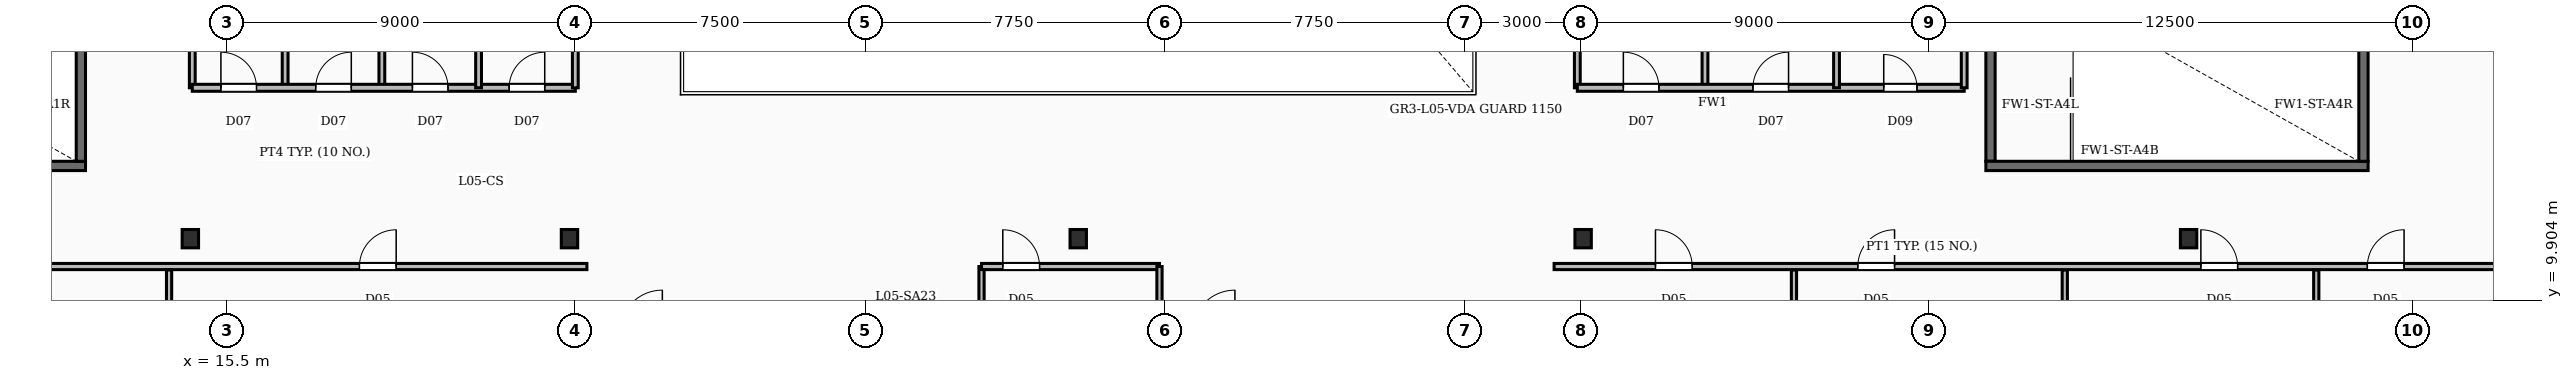
"""IFC4 building model, lengths in metres.
Left out: names, types, materials, properties, quantities, classifications, styles, units other than length and angle.
Written with IfcOpenShell. Run it as: python <this file> out.ifc"""

import sys

from ifc_helpers import new_model, si_unit, direction, frame, frame_2d, origin, origin_2d, place, context, subcontext, project, spatial, rectangle, i_section, extrude, element, fill, save


model = new_model("IFC4")
c1 = context("Model", 3, precision=1e-05, world=origin(), true_north=direction((0.0, 1.0)))
c2 = subcontext(c1, "Body", "Model", "MODEL_VIEW")
j1 = project(units=[si_unit("LENGTHUNIT", "METRE"), si_unit("PLANEANGLEUNIT", "RADIAN")], contexts=[c1])
p1 = place(None, origin())
s1 = spatial("IfcSite", under=j1, at=p1, CompositionType="ELEMENT")
p2 = place(p1, origin())
s2 = spatial("IfcBuilding", under=s1, at=p2, CompositionType="ELEMENT")
p3 = place(p2, frame((0.0, 0.0, 28.0)))
s3 = spatial("IfcBuildingStorey", under=s2, at=p3, CompositionType="ELEMENT", Elevation=28.0)
for number, where, z_axis, x_axis in (
    (1, (14.55, 11.5, -0.35), (0.0, 0.0, 1.0), (1.0, 0.0, 0.0)),
    (2, (24.35, 11.5, -0.35), (0.0, 0.0, 1.0), (1.0, 0.0, 0.0)),
    (3, (37.5, 11.5, -0.35), (0.0, 0.0, 1.0), (1.0, 0.0, 0.0)),
    (4, (50.55, 11.5, -0.35), (0.0, 0.0, 1.0), (1.0, 0.0, 0.0)),
    (5, (66.2, 11.5, -0.35), (0.0, 0.0, 1.0), (1.0, 0.0, 0.0)),
):
    element("IfcColumn", number, at=place(p3, frame(where, z_axis=z_axis, x_axis=x_axis)), inside=s3, PredefinedType="COLUMN", context=c2, shape_type="SweptSolid", body=[
        extrude(i_section(OverallWidth=0.424, OverallDepth=0.474, WebThickness=0.048, FlangeThickness=0.077, FilletRadius=0.02, at=origin_2d()), origin(), (0.0, 0.0, 1.0), 5.9),
    ])
p4 = place(p3, frame((1.96, 13.38, 0.0), z_axis=(0.0, 0.0, 1.0), x_axis=(1.0, 0.0, 0.0)))
e6 = element("IfcWall", 6, at=p4, inside=s3, PredefinedType="SOLIDWALL", context=c2, shape_type="SweptSolid", body=[
    extrude(rectangle(XDim=9.88, YDim=0.24, at=frame_2d((4.94, 0.0))), origin(), (0.0, 0.0, 1.0), 5.55),
])
p5 = place(p3, frame((11.72, 13.5, 0.0), z_axis=(0.0, 0.0, 1.0), x_axis=(0.0, 1.0, 0.0)))
e7 = element("IfcWall", 7, at=p5, inside=s3, PredefinedType="SOLIDWALL", context=c2, shape_type="SweptSolid", body=[
    extrude(rectangle(XDim=4.15, YDim=0.24, at=frame_2d((2.075, 0.0))), origin(), (0.0, 0.0, 1.0), 5.55),
])
p6 = place(p3, frame((60.96, 13.38, 0.0), z_axis=(0.0, 0.0, 1.0), x_axis=(1.0, 0.0, 0.0)))
e8 = element("IfcWall", 8, at=p6, inside=s3, PredefinedType="SOLIDWALL", context=c2, shape_type="SweptSolid", body=[
    extrude(rectangle(XDim=9.88, YDim=0.24, at=frame_2d((4.94, 0.0))), origin(), (0.0, 0.0, 1.0), 5.55),
])
for number, where, z_axis, x_axis in (
    (9, (61.08, 13.5, 0.0), (0.0, 0.0, 1.0), (0.0, 1.0, 0.0)),
    (10, (70.72, 13.5, 0.0), (0.0, 0.0, 1.0), (0.0, 1.0, 0.0)),
):
    element("IfcWall", number, at=place(p3, frame(where, z_axis=z_axis, x_axis=x_axis)), inside=s3, PredefinedType="SOLIDWALL", context=c2, shape_type="SweptSolid", body=[
        extrude(rectangle(XDim=4.15, YDim=0.24, at=frame_2d((2.075, 0.0))), origin(), (0.0, 0.0, 1.0), 5.55),
    ])
for number, where, z_axis, x_axis in (
    (11, (17.0, 15.4, 0.0), (0.0, 0.0, 1.0), (0.0, 1.0, 0.0)),
    (12, (19.5, 15.4, 0.0), (0.0, 0.0, 1.0), (0.0, 1.0, 0.0)),
    (13, (22.0, 15.4, 0.0), (0.0, 0.0, 1.0), (0.0, 1.0, 0.0)),
):
    element("IfcWall", number, at=place(p3, frame(where, z_axis=z_axis, x_axis=x_axis)), inside=s3, PredefinedType="PARTITIONING", context=c2, shape_type="SweptSolid", body=[
        extrude(rectangle(XDim=3.58, YDim=0.15, at=frame_2d((1.79, 0.0))), origin(), (0.0, 0.0, 1.0), 4.61),
    ])
p7 = place(p3, frame((14.6, 15.4, 0.0), z_axis=(0.0, 0.0, 1.0), x_axis=(1.0, 0.0, 0.0)))
e14 = element("IfcWall", 14, at=p7, inside=s3, PredefinedType="PARTITIONING", context=c2, shape_type="SweptSolid", body=[
    extrude(rectangle(XDim=9.9, YDim=0.18, at=frame_2d((4.95, 0.0))), origin(), (0.0, 0.0, 1.0), 4.61),
])
p8 = place(p7, frame((0.74, 0.0, 0.0)))
e15 = element("IfcOpeningElement", 15, at=p8, cuts=e14, PredefinedType="OPENING", context=c2, shape_type="SweptSolid", body=[
    extrude(rectangle(XDim=0.92, YDim=2.1, at=frame_2d((0.46, 1.05))), frame((0.0, 0.1, 0.0), z_axis=(0.0, -1.0, 0.0), x_axis=(1.0, 0.0, 0.0)), (0.0, 0.0, 1.0), 0.2),
])
p9 = place(p7, frame((3.19, 0.0, 0.0)))
e16 = element("IfcOpeningElement", 16, at=p9, cuts=e14, PredefinedType="OPENING", context=c2, shape_type="SweptSolid", body=[
    extrude(rectangle(XDim=0.92, YDim=2.1, at=frame_2d((0.46, 1.05))), frame((0.0, 0.1, 0.0), z_axis=(0.0, -1.0, 0.0), x_axis=(1.0, 0.0, 0.0)), (0.0, 0.0, 1.0), 0.2),
])
p10 = place(p7, frame((5.69, 0.0, 0.0)))
e17 = element("IfcOpeningElement", 17, at=p10, cuts=e14, PredefinedType="OPENING", context=c2, shape_type="SweptSolid", body=[
    extrude(rectangle(XDim=0.92, YDim=2.1, at=frame_2d((0.46, 1.05))), frame((0.0, 0.1, 0.0), z_axis=(0.0, -1.0, 0.0), x_axis=(1.0, 0.0, 0.0)), (0.0, 0.0, 1.0), 0.2),
])
p11 = place(p7, frame((8.19, 0.0, 0.0)))
e18 = element("IfcOpeningElement", 18, at=p11, cuts=e14, PredefinedType="OPENING", context=c2, shape_type="SweptSolid", body=[
    extrude(rectangle(XDim=0.92, YDim=2.1, at=frame_2d((0.46, 1.05))), frame((0.0, 0.1, 0.0), z_axis=(0.0, -1.0, 0.0), x_axis=(1.0, 0.0, 0.0)), (0.0, 0.0, 1.0), 0.2),
])
p12 = place(p3, frame((14.6, 15.4, 0.0), z_axis=(0.0, 0.0, 1.0), x_axis=(0.0, 1.0, 0.0)))
e19 = element("IfcWall", 19, at=p12, inside=s3, PredefinedType="PARTITIONING", context=c2, shape_type="SweptSolid", body=[
    extrude(rectangle(XDim=3.58, YDim=0.15, at=frame_2d((1.79, 0.0))), origin(), (0.0, 0.0, 1.0), 3.6),
])
for number, where, z_axis, x_axis in (
    (20, (24.5, 15.4, 0.0), (0.0, 0.0, 1.0), (0.0, 1.0, 0.0)),
    (21, (53.7, 15.4, 0.0), (0.0, 0.0, 1.0), (0.0, 1.0, 0.0)),
    (22, (57.1, 15.4, 0.0), (0.0, 0.0, 1.0), (0.0, 1.0, 0.0)),
):
    element("IfcWall", number, at=place(p3, frame(where, z_axis=z_axis, x_axis=x_axis)), inside=s3, PredefinedType="PARTITIONING", context=c2, shape_type="SweptSolid", body=[
        extrude(rectangle(XDim=3.58, YDim=0.15, at=frame_2d((1.79, 0.0))), origin(), (0.0, 0.0, 1.0), 4.61),
    ])
p13 = place(p3, frame((50.4, 15.4, 0.0), z_axis=(0.0, 0.0, 1.0), x_axis=(1.0, 0.0, 0.0)))
e23 = element("IfcWall", 23, at=p13, inside=s3, PredefinedType="SOLIDWALL", context=c2, shape_type="SweptSolid", body=[
    extrude(rectangle(XDim=10.0, YDim=0.18, at=frame_2d((5.0, 0.0))), origin(), (0.0, 0.0, 1.0), 4.61),
])
p14 = place(p13, frame((1.19, 0.0, 0.0)))
e24 = element("IfcOpeningElement", 24, at=p14, cuts=e23, PredefinedType="OPENING", context=c2, shape_type="SweptSolid", body=[
    extrude(rectangle(XDim=0.92, YDim=2.1, at=frame_2d((0.46, 1.05))), frame((0.0, 0.1, 0.0), z_axis=(0.0, -1.0, 0.0), x_axis=(1.0, 0.0, 0.0)), (0.0, 0.0, 1.0), 0.2),
])
p15 = place(p13, frame((4.54, 0.0, 0.0)))
e25 = element("IfcOpeningElement", 25, at=p15, cuts=e23, PredefinedType="OPENING", context=c2, shape_type="SweptSolid", body=[
    extrude(rectangle(XDim=0.92, YDim=2.1, at=frame_2d((0.46, 1.05))), frame((0.0, 0.1, 0.0), z_axis=(0.0, -1.0, 0.0), x_axis=(1.0, 0.0, 0.0)), (0.0, 0.0, 1.0), 0.2),
])
p16 = place(p13, frame((7.92, 0.0, 0.0)))
e26 = element("IfcOpeningElement", 26, at=p16, cuts=e23, PredefinedType="OPENING", context=c2, shape_type="SweptSolid", body=[
    extrude(rectangle(XDim=0.86, YDim=2.05, at=frame_2d((0.43, 1.025))), frame((0.0, 0.1, 0.0), z_axis=(0.0, -1.0, 0.0), x_axis=(1.0, 0.0, 0.0)), (0.0, 0.0, 1.0), 0.2),
])
for number, where, z_axis, x_axis in (
    (27, (50.4, 15.4, 0.0), (0.0, 0.0, 1.0), (0.0, 1.0, 0.0)),
    (28, (60.4, 15.4, 0.0), (0.0, 0.0, 1.0), (0.0, 1.0, 0.0)),
):
    element("IfcWall", number, at=place(p3, frame(where, z_axis=z_axis, x_axis=x_axis)), inside=s3, PredefinedType="PARTITIONING", context=c2, shape_type="SweptSolid", body=[
        extrude(rectangle(XDim=3.58, YDim=0.15, at=frame_2d((1.79, 0.0))), origin(), (0.0, 0.0, 1.0), 4.61),
    ])
p17 = place(p3, frame((14.0, 0.0, 0.0), z_axis=(0.0, 0.0, 1.0), x_axis=(0.0, 1.0, 0.0)))
e29 = element("IfcWall", 29, at=p17, inside=s3, PredefinedType="PARTITIONING", context=c2, shape_type="SweptSolid", body=[
    extrude(rectangle(XDim=10.69, YDim=0.135, at=frame_2d((5.345, 0.0))), origin(), (0.0, 0.0, 1.0), 4.61),
])
p18 = place(p17, frame((2.2, 0.0, 0.0)))
e30 = element("IfcOpeningElement", 30, at=p18, cuts=e29, PredefinedType="OPENING", context=c2, shape_type="SweptSolid", body=[
    extrude(rectangle(XDim=0.95, YDim=2.15, at=frame_2d((0.475, 1.075))), frame((0.0, 0.077, 0.0), z_axis=(0.0, -1.0, 0.0), x_axis=(1.0, 0.0, 0.0)), (0.0, 0.0, 1.0), 0.155),
])
p19 = place(p3, frame((0.0, 10.78, 0.0), z_axis=(0.0, 0.0, 1.0), x_axis=(1.0, 0.0, 0.0)))
e31 = element("IfcWall", 31, at=p19, inside=s3, PredefinedType="PARTITIONING", context=c2, shape_type="SweptSolid", body=[
    extrude(rectangle(XDim=24.8, YDim=0.16, at=frame_2d((12.4, 0.0))), origin(), (0.0, 0.0, 1.0), 4.61),
])
p20 = place(p19, frame((18.92, 0.0, 0.0)))
e32 = element("IfcOpeningElement", 32, at=p20, cuts=e31, PredefinedType="OPENING", context=c2, shape_type="SweptSolid", body=[
    extrude(rectangle(XDim=0.95, YDim=2.15, at=frame_2d((0.475, 1.075))), frame((0.0, 0.09, 0.0), z_axis=(0.0, -1.0, 0.0), x_axis=(1.0, 0.0, 0.0)), (0.0, 0.0, 1.0), 0.18),
])
p21 = place(p3, frame((56.0, 0.0, 0.0), z_axis=(0.0, 0.0, 1.0), x_axis=(0.0, 1.0, 0.0)))
e33 = element("IfcWall", 33, at=p21, inside=s3, PredefinedType="PARTITIONING", context=c2, shape_type="SweptSolid", body=[
    extrude(rectangle(XDim=10.69, YDim=0.135, at=frame_2d((5.345, 0.0))), origin(), (0.0, 0.0, 1.0), 4.61),
])
p22 = place(p21, frame((2.2, 0.0, 0.0)))
e34 = element("IfcOpeningElement", 34, at=p22, cuts=e33, PredefinedType="OPENING", context=c2, shape_type="SweptSolid", body=[
    extrude(rectangle(XDim=0.95, YDim=2.15, at=frame_2d((0.475, 1.075))), frame((0.0, 0.077, 0.0), z_axis=(0.0, -1.0, 0.0), x_axis=(1.0, 0.0, 0.0)), (0.0, 0.0, 1.0), 0.155),
])
p23 = place(p3, frame((63.0, 0.0, 0.0), z_axis=(0.0, 0.0, 1.0), x_axis=(0.0, 1.0, 0.0)))
e35 = element("IfcWall", 35, at=p23, inside=s3, PredefinedType="PARTITIONING", context=c2, shape_type="SweptSolid", body=[
    extrude(rectangle(XDim=10.69, YDim=0.135, at=frame_2d((5.345, 0.0))), origin(), (0.0, 0.0, 1.0), 4.61),
])
p24 = place(p23, frame((2.2, 0.0, 0.0)))
e36 = element("IfcOpeningElement", 36, at=p24, cuts=e35, PredefinedType="OPENING", context=c2, shape_type="SweptSolid", body=[
    extrude(rectangle(XDim=0.95, YDim=2.15, at=frame_2d((0.475, 1.075))), frame((0.0, 0.077, 0.0), z_axis=(0.0, -1.0, 0.0), x_axis=(1.0, 0.0, 0.0)), (0.0, 0.0, 1.0), 0.155),
])
p25 = place(p3, frame((69.5, 0.0, 0.0), z_axis=(0.0, 0.0, 1.0), x_axis=(0.0, 1.0, 0.0)))
e37 = element("IfcWall", 37, at=p25, inside=s3, PredefinedType="PARTITIONING", context=c2, shape_type="SweptSolid", body=[
    extrude(rectangle(XDim=10.69, YDim=0.135, at=frame_2d((5.345, 0.0))), origin(), (0.0, 0.0, 1.0), 4.61),
])
p26 = place(p25, frame((2.2, 0.0, 0.0)))
e38 = element("IfcOpeningElement", 38, at=p26, cuts=e37, PredefinedType="OPENING", context=c2, shape_type="SweptSolid", body=[
    extrude(rectangle(XDim=0.95, YDim=2.15, at=frame_2d((0.475, 1.075))), frame((0.0, 0.077, 0.0), z_axis=(0.0, -1.0, 0.0), x_axis=(1.0, 0.0, 0.0)), (0.0, 0.0, 1.0), 0.155),
])
p27 = place(p3, frame((49.8, 10.78, 0.0), z_axis=(0.0, 0.0, 1.0), x_axis=(1.0, 0.0, 0.0)))
e39 = element("IfcWall", 39, at=p27, inside=s3, PredefinedType="PARTITIONING", context=c2, shape_type="SweptSolid", body=[
    extrude(rectangle(XDim=29.7, YDim=0.16, at=frame_2d((14.85, 0.0))), origin(), (0.0, 0.0, 1.0), 4.61),
])
p28 = place(p27, frame((2.62, 0.0, 0.0)))
e40 = element("IfcOpeningElement", 40, at=p28, cuts=e39, PredefinedType="OPENING", context=c2, shape_type="SweptSolid", body=[
    extrude(rectangle(XDim=0.95, YDim=2.15, at=frame_2d((0.475, 1.075))), frame((0.0, 0.09, 0.0), z_axis=(0.0, -1.0, 0.0), x_axis=(1.0, 0.0, 0.0)), (0.0, 0.0, 1.0), 0.18),
])
p29 = place(p27, frame((7.85, 0.0, 0.0)))
e41 = element("IfcOpeningElement", 41, at=p29, cuts=e39, PredefinedType="OPENING", context=c2, shape_type="SweptSolid", body=[
    extrude(rectangle(XDim=0.95, YDim=2.15, at=frame_2d((0.475, 1.075))), frame((0.0, 0.09, 0.0), z_axis=(0.0, -1.0, 0.0), x_axis=(1.0, 0.0, 0.0)), (0.0, 0.0, 1.0), 0.18),
])
p30 = place(p27, frame((16.718, 0.0, 0.0)))
e42 = element("IfcOpeningElement", 42, at=p30, cuts=e39, PredefinedType="OPENING", context=c2, shape_type="SweptSolid", body=[
    extrude(rectangle(XDim=0.95, YDim=2.15, at=frame_2d((0.475, 1.075))), frame((0.0, 0.09, 0.0), z_axis=(0.0, -1.0, 0.0), x_axis=(1.0, 0.0, 0.0)), (0.0, 0.0, 1.0), 0.18),
])
p31 = place(p27, frame((21.02, 0.0, 0.0)))
e43 = element("IfcOpeningElement", 43, at=p31, cuts=e39, PredefinedType="OPENING", context=c2, shape_type="SweptSolid", body=[
    extrude(rectangle(XDim=0.95, YDim=2.15, at=frame_2d((0.475, 1.075))), frame((0.0, 0.09, 0.0), z_axis=(0.0, -1.0, 0.0), x_axis=(1.0, 0.0, 0.0)), (0.0, 0.0, 1.0), 0.18),
])
p32 = place(p3, frame((35.0, 10.78, 0.0), z_axis=(0.0, 0.0, 1.0), x_axis=(1.0, 0.0, 0.0)))
e44 = element("IfcWall", 44, at=p32, inside=s3, PredefinedType="PARTITIONING", context=c2, shape_type="SweptSolid", body=[
    extrude(rectangle(XDim=4.6, YDim=0.16, at=frame_2d((2.3, 0.0))), origin(), (0.0, 0.0, 1.0), 4.61),
])
p33 = place(p32, frame((0.55, 0.0, 0.0)))
e45 = element("IfcOpeningElement", 45, at=p33, cuts=e44, PredefinedType="OPENING", context=c2, shape_type="SweptSolid", body=[
    extrude(rectangle(XDim=0.95, YDim=2.15, at=frame_2d((0.475, 1.075))), frame((0.0, 0.09, 0.0), z_axis=(0.0, -1.0, 0.0), x_axis=(1.0, 0.0, 0.0)), (0.0, 0.0, 1.0), 0.18),
])
for number, where, z_axis, x_axis in (
    (46, (35.0, 0.0, 0.0), (0.0, 0.0, 1.0), (0.0, 1.0, 0.0)),
    (47, (39.6, 0.0, 0.0), (0.0, 0.0, 1.0), (0.0, 1.0, 0.0)),
):
    element("IfcWall", number, at=place(p3, frame(where, z_axis=z_axis, x_axis=x_axis)), inside=s3, PredefinedType="PARTITIONING", context=c2, shape_type="SweptSolid", body=[
        extrude(rectangle(XDim=10.78, YDim=0.135, at=frame_2d((5.39, 0.0))), origin(), (0.0, 0.0, 1.0), 4.61),
    ])
p34 = place(p8, origin())
e48 = element("IfcDoor", 48, at=p34, inside=s3, OperationType="SINGLE_SWING_LEFT", PredefinedType="DOOR", context=c2, shape_type="SweptSolid", body=[
    extrude(rectangle(XDim=0.92, YDim=2.1, at=frame_2d((0.46, 1.05))), frame((0.0, 0.025, 0.0), z_axis=(0.0, -1.0, 0.0), x_axis=(1.0, 0.0, 0.0)), (0.0, 0.0, 1.0), 0.05),
])
fill(e15, e48)
p35 = place(p9, origin())
e49 = element("IfcDoor", 49, at=p35, inside=s3, OperationType="SINGLE_SWING_RIGHT", PredefinedType="DOOR", context=c2, shape_type="SweptSolid", body=[
    extrude(rectangle(XDim=0.92, YDim=2.1, at=frame_2d((0.46, 1.05))), frame((0.0, 0.025, 0.0), z_axis=(0.0, -1.0, 0.0), x_axis=(1.0, 0.0, 0.0)), (0.0, 0.0, 1.0), 0.05),
])
fill(e16, e49)
p36 = place(p10, origin())
e50 = element("IfcDoor", 50, at=p36, inside=s3, OperationType="SINGLE_SWING_LEFT", PredefinedType="DOOR", context=c2, shape_type="SweptSolid", body=[
    extrude(rectangle(XDim=0.92, YDim=2.1, at=frame_2d((0.46, 1.05))), frame((0.0, 0.025, 0.0), z_axis=(0.0, -1.0, 0.0), x_axis=(1.0, 0.0, 0.0)), (0.0, 0.0, 1.0), 0.05),
])
fill(e17, e50)
p37 = place(p11, origin())
e51 = element("IfcDoor", 51, at=p37, inside=s3, OperationType="SINGLE_SWING_RIGHT", PredefinedType="DOOR", context=c2, shape_type="SweptSolid", body=[
    extrude(rectangle(XDim=0.92, YDim=2.1, at=frame_2d((0.46, 1.05))), frame((0.0, 0.025, 0.0), z_axis=(0.0, -1.0, 0.0), x_axis=(1.0, 0.0, 0.0)), (0.0, 0.0, 1.0), 0.05),
])
fill(e18, e51)
p38 = place(p14, origin())
e52 = element("IfcDoor", 52, at=p38, inside=s3, OperationType="SINGLE_SWING_LEFT", PredefinedType="DOOR", context=c2, shape_type="SweptSolid", body=[
    extrude(rectangle(XDim=0.92, YDim=2.1, at=frame_2d((0.46, 1.05))), frame((0.0, 0.025, 0.0), z_axis=(0.0, -1.0, 0.0), x_axis=(1.0, 0.0, 0.0)), (0.0, 0.0, 1.0), 0.05),
])
fill(e24, e52)
p39 = place(p15, origin())
e53 = element("IfcDoor", 53, at=p39, inside=s3, OperationType="SINGLE_SWING_RIGHT", PredefinedType="DOOR", context=c2, shape_type="SweptSolid", body=[
    extrude(rectangle(XDim=0.92, YDim=2.1, at=frame_2d((0.46, 1.05))), frame((0.0, 0.025, 0.0), z_axis=(0.0, -1.0, 0.0), x_axis=(1.0, 0.0, 0.0)), (0.0, 0.0, 1.0), 0.05),
])
fill(e25, e53)
p40 = place(p16, origin())
e54 = element("IfcDoor", 54, at=p40, inside=s3, OperationType="SINGLE_SWING_LEFT", PredefinedType="DOOR", context=c2, shape_type="SweptSolid", body=[
    extrude(rectangle(XDim=0.86, YDim=2.05, at=frame_2d((0.43, 1.025))), frame((0.0, 0.025, 0.0), z_axis=(0.0, -1.0, 0.0), x_axis=(1.0, 0.0, 0.0)), (0.0, 0.0, 1.0), 0.05),
])
fill(e26, e54)
p41 = place(p20, origin())
e55 = element("IfcDoor", 55, at=p41, inside=s3, OperationType="SINGLE_SWING_RIGHT", PredefinedType="DOOR", context=c2, shape_type="SweptSolid", body=[
    extrude(rectangle(XDim=0.95, YDim=2.15, at=frame_2d((0.475, 1.075))), frame((0.0, 0.025, 0.0), z_axis=(0.0, -1.0, 0.0), x_axis=(1.0, 0.0, 0.0)), (0.0, 0.0, 1.0), 0.05),
])
fill(e32, e55)
p42 = place(p28, origin())
e56 = element("IfcDoor", 56, at=p42, inside=s3, OperationType="SINGLE_SWING_LEFT", PredefinedType="DOOR", context=c2, shape_type="SweptSolid", body=[
    extrude(rectangle(XDim=0.95, YDim=2.15, at=frame_2d((0.475, 1.075))), frame((0.0, 0.025, 0.0), z_axis=(0.0, -1.0, 0.0), x_axis=(1.0, 0.0, 0.0)), (0.0, 0.0, 1.0), 0.05),
])
fill(e40, e56)
p43 = place(p29, origin())
e57 = element("IfcDoor", 57, at=p43, inside=s3, OperationType="SINGLE_SWING_RIGHT", PredefinedType="DOOR", context=c2, shape_type="SweptSolid", body=[
    extrude(rectangle(XDim=0.95, YDim=2.15, at=frame_2d((0.475, 1.075))), frame((0.0, 0.025, 0.0), z_axis=(0.0, -1.0, 0.0), x_axis=(1.0, 0.0, 0.0)), (0.0, 0.0, 1.0), 0.05),
])
fill(e41, e57)
p44 = place(p30, origin())
e58 = element("IfcDoor", 58, at=p44, inside=s3, OperationType="SINGLE_SWING_LEFT", PredefinedType="DOOR", context=c2, shape_type="SweptSolid", body=[
    extrude(rectangle(XDim=0.95, YDim=2.15, at=frame_2d((0.475, 1.075))), frame((0.0, 0.025, 0.0), z_axis=(0.0, -1.0, 0.0), x_axis=(1.0, 0.0, 0.0)), (0.0, 0.0, 1.0), 0.05),
])
fill(e42, e58)
p45 = place(p31, origin())
e59 = element("IfcDoor", 59, at=p45, inside=s3, OperationType="SINGLE_SWING_RIGHT", PredefinedType="DOOR", context=c2, shape_type="SweptSolid", body=[
    extrude(rectangle(XDim=0.95, YDim=2.15, at=frame_2d((0.475, 1.075))), frame((0.0, 0.025, 0.0), z_axis=(0.0, -1.0, 0.0), x_axis=(1.0, 0.0, 0.0)), (0.0, 0.0, 1.0), 0.05),
])
fill(e43, e59)
p46 = place(p33, origin())
e60 = element("IfcDoor", 60, at=p46, inside=s3, OperationType="SINGLE_SWING_LEFT", PredefinedType="DOOR", context=c2, shape_type="SweptSolid", body=[
    extrude(rectangle(XDim=0.95, YDim=2.15, at=frame_2d((0.475, 1.075))), frame((0.0, 0.025, 0.0), z_axis=(0.0, -1.0, 0.0), x_axis=(1.0, 0.0, 0.0)), (0.0, 0.0, 1.0), 0.05),
])
fill(e45, e60)
save(model, sys.argv[1])
